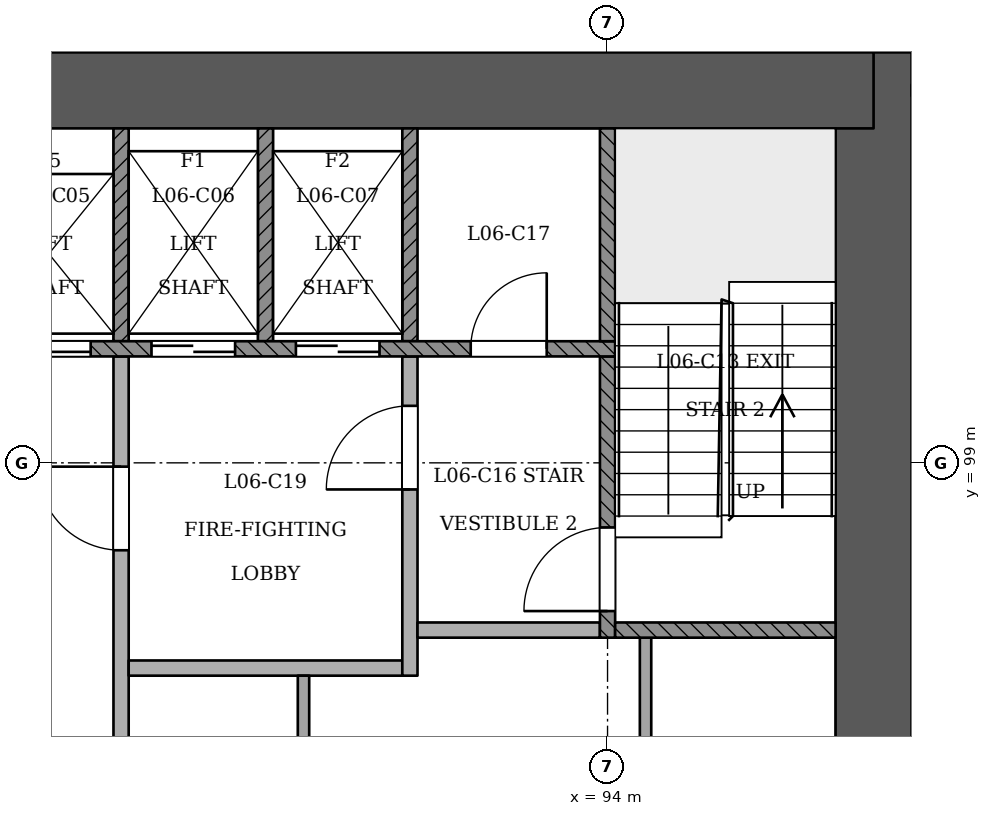
"""IFC4 building model, lengths in metres.
Left out: names, types, materials, properties, quantities, classifications, styles, units other than length and angle.
Written with IfcOpenShell. Run it as: python <this file> out.ifc"""

import sys

from ifc_helpers import new_model, si_unit, direction, frame, frame_2d, origin, place, context, subcontext, project, spatial, rectangle, extrude, element, fill, save


model = new_model("IFC4")
c1 = context("Model", 3, precision=1e-05, world=origin(), true_north=direction((0.0, 1.0)))
c2 = subcontext(c1, "Body", "Model", "MODEL_VIEW")
j1 = project(units=[si_unit("LENGTHUNIT", "METRE"), si_unit("PLANEANGLEUNIT", "RADIAN")], contexts=[c1])
p1 = place(None, origin())
s1 = spatial("IfcSite", under=j1, at=p1, CompositionType="ELEMENT")
p2 = place(p1, origin())
s2 = spatial("IfcBuilding", under=s1, at=p2, CompositionType="ELEMENT")
p3 = place(p2, frame((0.0, 0.0, 30.6)))
s3 = spatial("IfcBuildingStorey", under=s2, at=p3, CompositionType="ELEMENT", Elevation=30.6)
p4 = place(p3, frame((97.5, 92.9, 0.0), z_axis=(0.0, 0.0, 1.0), x_axis=(0.0, 1.0, 0.0)))
e1 = element("IfcWall", 1, at=p4, inside=s3, PredefinedType="SHEAR", context=c2, shape_type="SweptSolid", body=[
    extrude(rectangle(XDim=11.5, YDim=1.0, at=frame_2d((5.75, 0.0))), origin(), (0.0, 0.0, 1.0), 3.6),
])
p5 = place(p3, frame((97.5, 103.9, 0.0), z_axis=(0.0, 0.0, 1.0), x_axis=(-1.0, 0.0, 0.0)))
e2 = element("IfcWall", 2, at=p5, inside=s3, PredefinedType="SHEAR", context=c2, shape_type="SweptSolid", body=[
    extrude(rectangle(XDim=25.5, YDim=1.0, at=frame_2d((12.75, 0.0))), origin(), (0.0, 0.0, 1.0), 3.6),
])
p6 = place(p3, frame((86.227, 57.403, 0.0), z_axis=(0.0, 0.0, 1.0), x_axis=(0.5000018851, 0.866024315419, 0.0)))
e3 = element("IfcWall", 3, at=p6, inside=s3, PredefinedType="PARTITIONING", context=c2, shape_type="SweptSolid", body=[
    extrude(rectangle(XDim=45.0, YDim=0.15, at=frame_2d((22.5, 0.0))), origin(), (0.0, 0.0, 1.0), 2.7),
])
p7 = place(p6, frame((0.72, 0.0, 0.0)))
e4 = element("IfcOpeningElement", 4, at=p7, cuts=e3, PredefinedType="OPENING", context=c2, shape_type="SweptSolid", body=[
    extrude(rectangle(XDim=1.0, YDim=2.1, at=frame_2d((0.5, 1.05))), frame((0.0, 0.085, 0.0), z_axis=(0.0, -1.0, 0.0), x_axis=(1.0, 0.0, 0.0)), (0.0, 0.0, 1.0), 0.171),
])
p8 = place(p6, frame((5.22, 0.0, 0.0)))
e5 = element("IfcOpeningElement", 5, at=p8, cuts=e3, PredefinedType="OPENING", context=c2, shape_type="SweptSolid", body=[
    extrude(rectangle(XDim=1.0, YDim=2.1, at=frame_2d((0.5, 1.05))), frame((0.0, 0.085, 0.0), z_axis=(0.0, -1.0, 0.0), x_axis=(1.0, 0.0, 0.0)), (0.0, 0.0, 1.0), 0.171),
])
p9 = place(p6, frame((11.78, 0.0, 0.0)))
e6 = element("IfcOpeningElement", 6, at=p9, cuts=e3, PredefinedType="OPENING", context=c2, shape_type="SweptSolid", body=[
    extrude(rectangle(XDim=1.0, YDim=2.1, at=frame_2d((0.5, 1.05))), frame((0.0, 0.085, 0.0), z_axis=(0.0, -1.0, 0.0), x_axis=(1.0, 0.0, 0.0)), (0.0, 0.0, 1.0), 0.171),
])
p10 = place(p6, frame((14.22, 0.0, 0.0)))
e7 = element("IfcOpeningElement", 7, at=p10, cuts=e3, PredefinedType="OPENING", context=c2, shape_type="SweptSolid", body=[
    extrude(rectangle(XDim=1.0, YDim=2.1, at=frame_2d((0.5, 1.05))), frame((0.0, 0.085, 0.0), z_axis=(0.0, -1.0, 0.0), x_axis=(1.0, 0.0, 0.0)), (0.0, 0.0, 1.0), 0.171),
])
p11 = place(p6, frame((19.75, 0.0, 0.0)))
e8 = element("IfcOpeningElement", 8, at=p11, cuts=e3, PredefinedType="OPENING", context=c2, shape_type="SweptSolid", body=[
    extrude(rectangle(XDim=1.0, YDim=2.1, at=frame_2d((0.5, 1.05))), frame((0.0, 0.085, 0.0), z_axis=(0.0, -1.0, 0.0), x_axis=(1.0, 0.0, 0.0)), (0.0, 0.0, 1.0), 0.171),
])
p12 = place(p6, frame((23.105, 0.0, 0.0)))
e9 = element("IfcOpeningElement", 9, at=p12, cuts=e3, PredefinedType="OPENING", context=c2, shape_type="SweptSolid", body=[
    extrude(rectangle(XDim=1.0, YDim=2.1, at=frame_2d((0.5, 1.05))), frame((0.0, 0.085, 0.0), z_axis=(0.0, -1.0, 0.0), x_axis=(1.0, 0.0, 0.0)), (0.0, 0.0, 1.0), 0.171),
])
p13 = place(p6, frame((28.75, 0.0, 0.0)))
e10 = element("IfcOpeningElement", 10, at=p13, cuts=e3, PredefinedType="OPENING", context=c2, shape_type="SweptSolid", body=[
    extrude(rectangle(XDim=1.0, YDim=2.1, at=frame_2d((0.5, 1.05))), frame((0.0, 0.085, 0.0), z_axis=(0.0, -1.0, 0.0), x_axis=(1.0, 0.0, 0.0)), (0.0, 0.0, 1.0), 0.171),
])
p14 = place(p6, frame((32.105, 0.0, 0.0)))
e11 = element("IfcOpeningElement", 11, at=p14, cuts=e3, PredefinedType="OPENING", context=c2, shape_type="SweptSolid", body=[
    extrude(rectangle(XDim=1.0, YDim=2.1, at=frame_2d((0.5, 1.05))), frame((0.0, 0.085, 0.0), z_axis=(0.0, -1.0, 0.0), x_axis=(1.0, 0.0, 0.0)), (0.0, 0.0, 1.0), 0.171),
])
p15 = place(p6, frame((36.504, 0.0, 0.0)))
e12 = element("IfcOpeningElement", 12, at=p15, cuts=e3, PredefinedType="OPENING", context=c2, shape_type="SweptSolid", body=[
    extrude(rectangle(XDim=1.0, YDim=2.1, at=frame_2d((0.5, 1.05))), frame((0.0, 0.085, 0.0), z_axis=(0.0, -1.0, 0.0), x_axis=(1.0, 0.0, 0.0)), (0.0, 0.0, 1.0), 0.171),
])
p16 = place(p6, frame((38.654, 0.0, 0.0)))
e13 = element("IfcOpeningElement", 13, at=p16, cuts=e3, PredefinedType="OPENING", context=c2, shape_type="SweptSolid", body=[
    extrude(rectangle(XDim=1.0, YDim=2.1, at=frame_2d((0.5, 1.05))), frame((0.0, 0.085, 0.0), z_axis=(0.0, -1.0, 0.0), x_axis=(1.0, 0.0, 0.0)), (0.0, 0.0, 1.0), 0.171),
])
p17 = place(p6, frame((41.071, 0.0, 0.0)))
e14 = element("IfcOpeningElement", 14, at=p17, cuts=e3, PredefinedType="OPENING", context=c2, shape_type="SweptSolid", body=[
    extrude(rectangle(XDim=1.1, YDim=2.1, at=frame_2d((0.55, 1.05))), frame((0.0, 0.085, 0.0), z_axis=(0.0, -1.0, 0.0), x_axis=(1.0, 0.0, 0.0)), (0.0, 0.0, 1.0), 0.171),
])
p18 = place(p3, frame((87.6, 93.4, 0.0), z_axis=(0.0, 0.0, 1.0), x_axis=(0.0, 1.0, 0.0)))
e15 = element("IfcWall", 15, at=p18, inside=s3, PredefinedType="PARTITIONING", context=c2, shape_type="SweptSolid", body=[
    extrude(rectangle(XDim=7.0, YDim=0.2, at=frame_2d((3.5, 0.0))), origin(), (0.0, 0.0, 1.0), 3.1),
])
p19 = place(p18, frame((4.45, 0.0, 0.0)))
e16 = element("IfcOpeningElement", 16, at=p19, cuts=e15, PredefinedType="OPENING", context=c2, shape_type="SweptSolid", body=[
    extrude(rectangle(XDim=1.1, YDim=2.1, at=frame_2d((0.55, 1.05))), frame((0.0, 0.11, 0.0), z_axis=(0.0, -1.0, 0.0), x_axis=(1.0, 0.0, 0.0)), (0.0, 0.0, 1.0), 0.221),
])
p20 = place(p3, frame((90.0, 93.4, 0.0), z_axis=(0.0, 0.0, 1.0), x_axis=(0.0, 1.0, 0.0)))
e17 = element("IfcWall", 17, at=p20, inside=s3, PredefinedType="PARTITIONING", context=c2, shape_type="SweptSolid", body=[
    extrude(rectangle(XDim=2.8, YDim=0.15, at=frame_2d((1.4, 0.0))), origin(), (0.0, 0.0, 1.0), 3.1),
])
p21 = place(p3, frame((94.5, 93.4, 0.0), z_axis=(0.0, 0.0, 1.0), x_axis=(0.0, 1.0, 0.0)))
e18 = element("IfcWall", 18, at=p21, inside=s3, PredefinedType="PARTITIONING", context=c2, shape_type="SweptSolid", body=[
    extrude(rectangle(XDim=3.3, YDim=0.15, at=frame_2d((1.65, 0.0))), origin(), (0.0, 0.0, 1.0), 3.1),
])
p22 = place(p3, frame((87.7, 96.3, 0.0), z_axis=(0.0, 0.0, 1.0), x_axis=(1.0, 0.0, 0.0)))
e19 = element("IfcWall", 19, at=p22, inside=s3, PredefinedType="PARTITIONING", context=c2, shape_type="SweptSolid", body=[
    extrude(rectangle(XDim=3.6, YDim=0.2, at=frame_2d((1.8, 0.0))), origin(), (0.0, 0.0, 1.0), 3.1),
])
p23 = place(p3, frame((91.4, 96.2, 0.0), z_axis=(0.0, 0.0, 1.0), x_axis=(0.0, 1.0, 0.0)))
e20 = element("IfcWall", 20, at=p23, inside=s3, PredefinedType="PARTITIONING", context=c2, shape_type="SweptSolid", body=[
    extrude(rectangle(XDim=4.2, YDim=0.2, at=frame_2d((2.1, 0.0))), origin(), (0.0, 0.0, 1.0), 3.1),
])
p24 = place(p23, frame((2.45, 0.0, 0.0)))
e21 = element("IfcOpeningElement", 21, at=p24, cuts=e20, PredefinedType="OPENING", context=c2, shape_type="SweptSolid", body=[
    extrude(rectangle(XDim=1.1, YDim=2.1, at=frame_2d((0.55, 1.05))), frame((0.0, 0.11, 0.0), z_axis=(0.0, -1.0, 0.0), x_axis=(1.0, 0.0, 0.0)), (0.0, 0.0, 1.0), 0.221),
])
p25 = place(p3, frame((91.5, 96.8, 0.0), z_axis=(0.0, 0.0, 1.0), x_axis=(1.0, 0.0, 0.0)))
e22 = element("IfcWall", 22, at=p25, inside=s3, PredefinedType="PARTITIONING", context=c2, shape_type="SweptSolid", body=[
    extrude(rectangle(XDim=2.4, YDim=0.2, at=frame_2d((1.2, 0.0))), origin(), (0.0, 0.0, 1.0), 3.1),
])
p26 = place(p3, frame((94.0, 96.7, 0.0), z_axis=(0.0, 0.0, 1.0), x_axis=(0.0, 1.0, 0.0)))
e23 = element("IfcWall", 23, at=p26, inside=s3, PredefinedType="SOLIDWALL", context=c2, shape_type="SweptSolid", body=[
    extrude(rectangle(XDim=3.7, YDim=0.2, at=frame_2d((1.85, 0.0))), origin(), (0.0, 0.0, 1.0), 3.1),
])
p27 = place(p26, frame((0.35, 0.0, 0.0)))
e24 = element("IfcOpeningElement", 24, at=p27, cuts=e23, PredefinedType="OPENING", context=c2, shape_type="SweptSolid", body=[
    extrude(rectangle(XDim=1.1, YDim=2.1, at=frame_2d((0.55, 1.05))), frame((0.0, 0.11, 0.0), z_axis=(0.0, -1.0, 0.0), x_axis=(1.0, 0.0, 0.0)), (0.0, 0.0, 1.0), 0.221),
])
p28 = place(p3, frame((94.1, 96.8, 0.0), z_axis=(0.0, 0.0, 1.0), x_axis=(1.0, 0.0, 0.0)))
e25 = element("IfcWall", 25, at=p28, inside=s3, PredefinedType="SOLIDWALL", context=c2, shape_type="SweptSolid", body=[
    extrude(rectangle(XDim=2.9, YDim=0.2, at=frame_2d((1.45, 0.0))), origin(), (0.0, 0.0, 1.0), 3.1),
])
p29 = place(p3, frame((75.9, 100.5, 0.0), z_axis=(0.0, 0.0, 1.0), x_axis=(1.0, 0.0, 0.0)))
e26 = element("IfcWall", 26, at=p29, inside=s3, PredefinedType="SOLIDWALL", context=c2, shape_type="SweptSolid", body=[
    extrude(rectangle(XDim=18.2, YDim=0.2, at=frame_2d((9.1, 0.0))), origin(), (0.0, 0.0, 1.0), 3.1),
])
p30 = place(p29, frame((2.6, 0.0, 0.0)))
e27 = element("IfcOpeningElement", 27, at=p30, cuts=e26, PredefinedType="OPENING", context=c2, shape_type="SweptSolid", body=[
    extrude(rectangle(XDim=1.1, YDim=2.1, at=frame_2d((0.55, 1.05))), frame((0.0, 0.11, 0.0), z_axis=(0.0, -1.0, 0.0), x_axis=(1.0, 0.0, 0.0)), (0.0, 0.0, 1.0), 0.221),
])
p31 = place(p29, frame((4.5, 0.0, 0.0)))
e28 = element("IfcOpeningElement", 28, at=p31, cuts=e26, PredefinedType="OPENING", context=c2, shape_type="SweptSolid", body=[
    extrude(rectangle(XDim=1.1, YDim=2.1, at=frame_2d((0.55, 1.05))), frame((0.0, 0.11, 0.0), z_axis=(0.0, -1.0, 0.0), x_axis=(1.0, 0.0, 0.0)), (0.0, 0.0, 1.0), 0.221),
])
p32 = place(p29, frame((6.4, 0.0, 0.0)))
e29 = element("IfcOpeningElement", 29, at=p32, cuts=e26, PredefinedType="OPENING", context=c2, shape_type="SweptSolid", body=[
    extrude(rectangle(XDim=1.1, YDim=2.1, at=frame_2d((0.55, 1.05))), frame((0.0, 0.11, 0.0), z_axis=(0.0, -1.0, 0.0), x_axis=(1.0, 0.0, 0.0)), (0.0, 0.0, 1.0), 0.221),
])
p33 = place(p29, frame((8.3, 0.0, 0.0)))
e30 = element("IfcOpeningElement", 30, at=p33, cuts=e26, PredefinedType="OPENING", context=c2, shape_type="SweptSolid", body=[
    extrude(rectangle(XDim=1.1, YDim=2.1, at=frame_2d((0.55, 1.05))), frame((0.0, 0.11, 0.0), z_axis=(0.0, -1.0, 0.0), x_axis=(1.0, 0.0, 0.0)), (0.0, 0.0, 1.0), 0.221),
])
p34 = place(p29, frame((10.2, 0.0, 0.0)))
e31 = element("IfcOpeningElement", 31, at=p34, cuts=e26, PredefinedType="OPENING", context=c2, shape_type="SweptSolid", body=[
    extrude(rectangle(XDim=1.1, YDim=2.1, at=frame_2d((0.55, 1.05))), frame((0.0, 0.11, 0.0), z_axis=(0.0, -1.0, 0.0), x_axis=(1.0, 0.0, 0.0)), (0.0, 0.0, 1.0), 0.221),
])
p35 = place(p29, frame((12.1, 0.0, 0.0)))
e32 = element("IfcOpeningElement", 32, at=p35, cuts=e26, PredefinedType="OPENING", context=c2, shape_type="SweptSolid", body=[
    extrude(rectangle(XDim=1.1, YDim=2.1, at=frame_2d((0.55, 1.05))), frame((0.0, 0.11, 0.0), z_axis=(0.0, -1.0, 0.0), x_axis=(1.0, 0.0, 0.0)), (0.0, 0.0, 1.0), 0.221),
])
p36 = place(p29, frame((14.0, 0.0, 0.0)))
e33 = element("IfcOpeningElement", 33, at=p36, cuts=e26, PredefinedType="OPENING", context=c2, shape_type="SweptSolid", body=[
    extrude(rectangle(XDim=1.1, YDim=2.1, at=frame_2d((0.55, 1.05))), frame((0.0, 0.11, 0.0), z_axis=(0.0, -1.0, 0.0), x_axis=(1.0, 0.0, 0.0)), (0.0, 0.0, 1.0), 0.221),
])
p37 = place(p29, frame((0.65, 0.0, 0.0)))
e34 = element("IfcOpeningElement", 34, at=p37, cuts=e26, PredefinedType="OPENING", context=c2, shape_type="SweptSolid", body=[
    extrude(rectangle(XDim=1.0, YDim=2.1, at=frame_2d((0.5, 1.05))), frame((0.0, 0.11, 0.0), z_axis=(0.0, -1.0, 0.0), x_axis=(1.0, 0.0, 0.0)), (0.0, 0.0, 1.0), 0.221),
])
p38 = place(p29, frame((16.3, 0.0, 0.0)))
e35 = element("IfcOpeningElement", 35, at=p38, cuts=e26, PredefinedType="OPENING", context=c2, shape_type="SweptSolid", body=[
    extrude(rectangle(XDim=1.0, YDim=2.1, at=frame_2d((0.5, 1.05))), frame((0.0, 0.11, 0.0), z_axis=(0.0, -1.0, 0.0), x_axis=(1.0, 0.0, 0.0)), (0.0, 0.0, 1.0), 0.221),
])
for number, where, z_axis, x_axis in (
    (36, (87.6, 100.6, 0.0), (0.0, 0.0, 1.0), (0.0, 1.0, 0.0)),
    (37, (89.5, 100.6, 0.0), (0.0, 0.0, 1.0), (0.0, 1.0, 0.0)),
    (38, (91.4, 100.6, 0.0), (0.0, 0.0, 1.0), (0.0, 1.0, 0.0)),
    (39, (94.0, 100.6, 0.0), (0.0, 0.0, 1.0), (0.0, 1.0, 0.0)),
):
    element("IfcWall", number, at=place(p3, frame(where, z_axis=z_axis, x_axis=x_axis)), inside=s3, PredefinedType="SOLIDWALL", context=c2, shape_type="SweptSolid", body=[
        extrude(rectangle(XDim=2.8, YDim=0.2, at=frame_2d((1.4, 0.0))), origin(), (0.0, 0.0, 1.0), 3.1),
    ])
p39 = place(p34, origin())
e40 = element("IfcDoor", 40, at=p39, inside=s3, OperationType="SLIDING_TO_RIGHT", PredefinedType="NOTDEFINED", context=c2, shape_type="SweptSolid", body=[
    extrude(rectangle(XDim=1.1, YDim=2.1, at=frame_2d((0.55, 1.05))), frame((0.0, 0.025, 0.0), z_axis=(0.0, -1.0, 0.0), x_axis=(1.0, 0.0, 0.0)), (0.0, 0.0, 1.0), 0.05),
])
fill(e31, e40)
p40 = place(p35, origin())
e41 = element("IfcDoor", 41, at=p40, inside=s3, OperationType="SLIDING_TO_RIGHT", PredefinedType="NOTDEFINED", context=c2, shape_type="SweptSolid", body=[
    extrude(rectangle(XDim=1.1, YDim=2.1, at=frame_2d((0.55, 1.05))), frame((0.0, 0.025, 0.0), z_axis=(0.0, -1.0, 0.0), x_axis=(1.0, 0.0, 0.0)), (0.0, 0.0, 1.0), 0.05),
])
fill(e32, e41)
p41 = place(p36, origin())
e42 = element("IfcDoor", 42, at=p41, inside=s3, OperationType="SLIDING_TO_LEFT", PredefinedType="NOTDEFINED", context=c2, shape_type="SweptSolid", body=[
    extrude(rectangle(XDim=1.1, YDim=2.1, at=frame_2d((0.55, 1.05))), frame((0.0, 0.025, 0.0), z_axis=(0.0, -1.0, 0.0), x_axis=(1.0, 0.0, 0.0)), (0.0, 0.0, 1.0), 0.05),
])
fill(e33, e42)
p42 = place(p27, origin())
e43 = element("IfcDoor", 43, at=p42, inside=s3, OperationType="SINGLE_SWING_LEFT", PredefinedType="NOTDEFINED", context=c2, shape_type="SweptSolid", body=[
    extrude(rectangle(XDim=1.1, YDim=2.1, at=frame_2d((0.55, 1.05))), frame((0.0, 0.025, 0.0), z_axis=(0.0, -1.0, 0.0), x_axis=(1.0, 0.0, 0.0)), (0.0, 0.0, 1.0), 0.05),
])
fill(e24, e43)
p43 = place(p19, origin())
e44 = element("IfcDoor", 44, at=p43, inside=s3, OperationType="SINGLE_SWING_RIGHT", PredefinedType="NOTDEFINED", context=c2, shape_type="SweptSolid", body=[
    extrude(rectangle(XDim=1.1, YDim=2.1, at=frame_2d((0.55, 1.05))), frame((0.0, 0.025, 0.0), z_axis=(0.0, -1.0, 0.0), x_axis=(1.0, 0.0, 0.0)), (0.0, 0.0, 1.0), 0.05),
])
fill(e16, e44)
p44 = place(p24, origin())
e45 = element("IfcDoor", 45, at=p44, inside=s3, OperationType="SINGLE_SWING_LEFT", PredefinedType="NOTDEFINED", context=c2, shape_type="SweptSolid", body=[
    extrude(rectangle(XDim=1.1, YDim=2.1, at=frame_2d((0.55, 1.05))), frame((0.0, 0.025, 0.0), z_axis=(0.0, -1.0, 0.0), x_axis=(1.0, 0.0, 0.0)), (0.0, 0.0, 1.0), 0.05),
])
fill(e21, e45)
p45 = place(p38, origin())
e46 = element("IfcDoor", 46, at=p45, inside=s3, OperationType="SINGLE_SWING_RIGHT", PredefinedType="NOTDEFINED", context=c2, shape_type="SweptSolid", body=[
    extrude(rectangle(XDim=1.0, YDim=2.1, at=frame_2d((0.5, 1.05))), frame((0.0, 0.025, 0.0), z_axis=(0.0, -1.0, 0.0), x_axis=(1.0, 0.0, 0.0)), (0.0, 0.0, 1.0), 0.05),
])
fill(e35, e46)
save(model, sys.argv[1])
